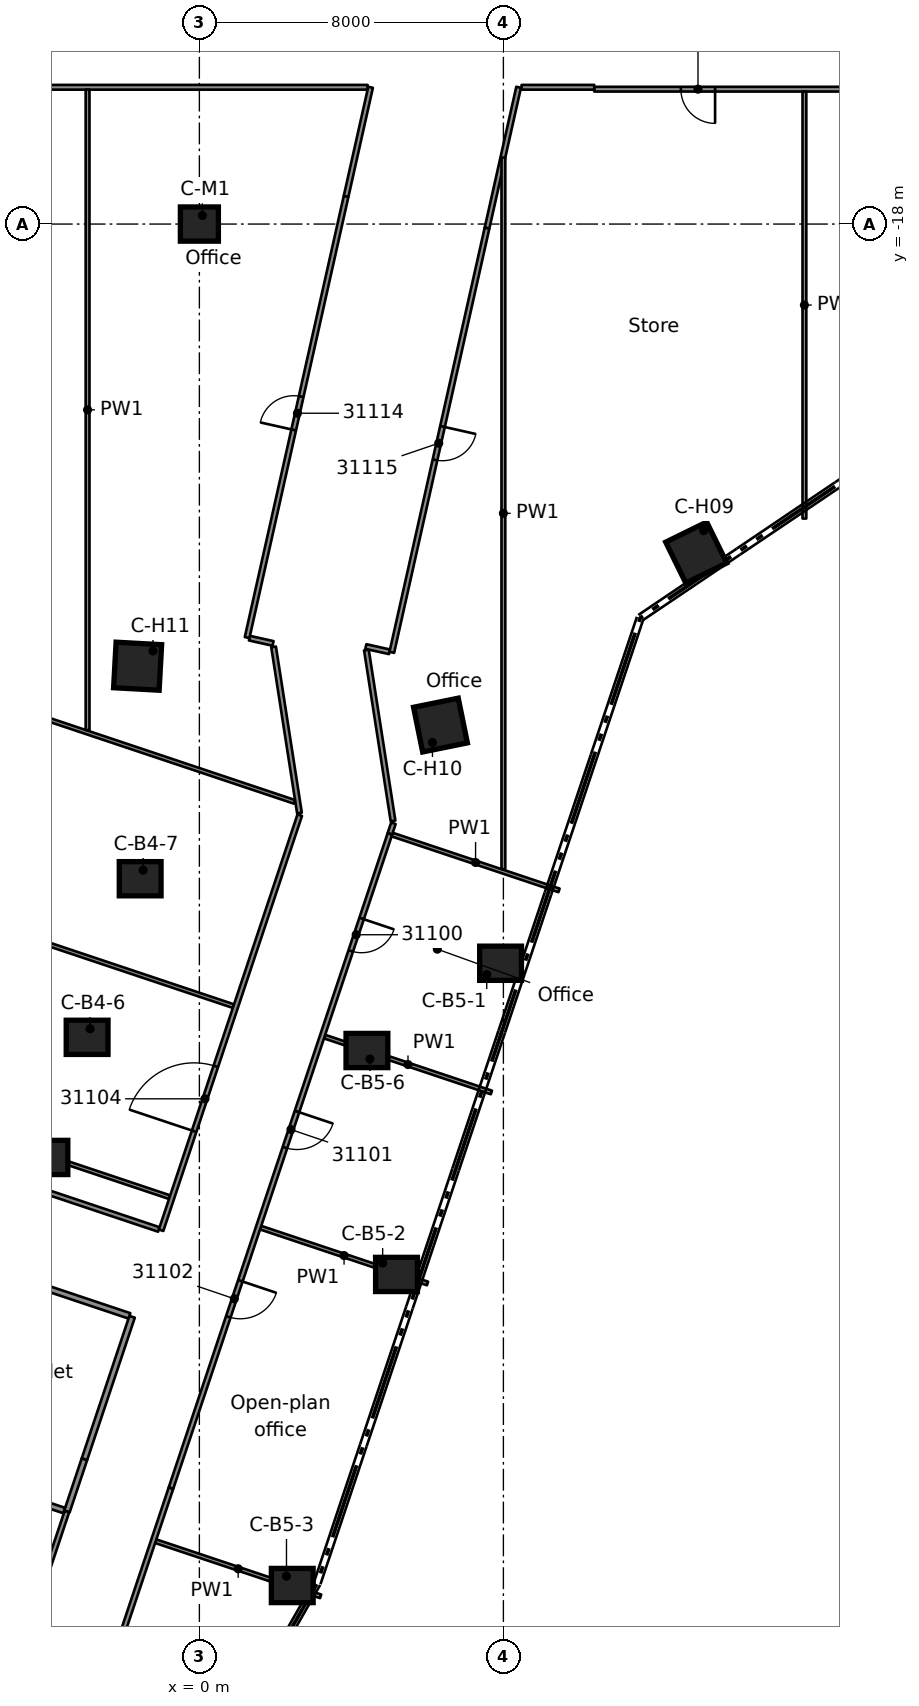
"""IFC4 building model, lengths in metres.
Left out: names, types, materials, properties, quantities, classifications, styles, units other than length and angle.
Written with IfcOpenShell. Run it as: python <this file> out.ifc"""

import sys

from ifc_helpers import new_model, si_unit, direction, frame, frame_2d, origin, origin_2d, place, context, subcontext, project, spatial, rectangle, extrude, element, fill, save


model = new_model("IFC4")
c1 = context("Model", 3, precision=1e-05, world=origin(), true_north=direction((0.0, 1.0)))
c2 = subcontext(c1, "Body", "Model", "MODEL_VIEW")
j1 = project(units=[si_unit("LENGTHUNIT", "METRE"), si_unit("PLANEANGLEUNIT", "RADIAN")], contexts=[c1])
p1 = place(None, origin())
s1 = spatial("IfcSite", under=j1, at=p1, CompositionType="ELEMENT")
p2 = place(p1, origin())
s2 = spatial("IfcBuilding", under=s1, at=p2, CompositionType="ELEMENT")
p3 = place(p2, frame((0.0, 0.0, 156.1)))
s3 = spatial("IfcBuildingStorey", under=s2, at=p3, CompositionType="ELEMENT", Elevation=156.1)
for number, where, z_axis, x_axis in (
    (1, (-4.012, -42.56, 0.0), (0.0, 0.0, 1.0), (1.0, 0.0, 0.0)),
    (2, (-2.954, -39.399, 0.0), (0.0, 0.0, 1.0), (1.0, 0.0, 0.0)),
    (3, (-1.558, -35.226, 0.0), (0.0, 0.0, 1.0), (1.0, 0.0, 0.0)),
    (4, (7.926, -37.45, 0.0), (0.0, 0.0, 1.0), (1.0, 0.0, 0.0)),
    (5, (5.187, -45.638, 0.0), (0.0, 0.0, 1.0), (1.0, 0.0, 0.0)),
    (6, (2.444, -53.823, 0.0), (0.0, 0.0, 1.0), (1.0, 0.0, 0.0)),
    (7, (4.409, -39.746, 0.0), (0.0, 0.0, 1.0), (1.0, 0.0, 0.0)),
):
    element("IfcColumn", number, at=place(p3, frame(where, z_axis=z_axis, x_axis=x_axis)), inside=s3, PredefinedType="COLUMN", context=c2, shape_type="SweptSolid", body=[
        extrude(rectangle(XDim=1.1, YDim=0.9, at=origin_2d()), origin(), (0.0, 0.0, 1.0), 3.5),
    ])
for number, where, z_axis, x_axis in (
    (8, (13.075, -26.644, 0.0), (0.0, 0.0, 1.0), (0.441, -0.898, 0.0)),
    (9, (6.344, -31.183, 0.0), (0.0, 0.0, 1.0), (0.199, -0.98, 0.0)),
    (10, (-1.625, -29.634, 0.0), (0.0, 0.0, 1.0), (-0.055, -0.998, 0.0)),
):
    element("IfcColumn", number, at=place(p3, frame(where, z_axis=z_axis, x_axis=x_axis)), inside=s3, PredefinedType="COLUMN", context=c2, shape_type="SweptSolid", body=[
        extrude(rectangle(XDim=1.2, YDim=1.2, at=origin_2d()), origin(), (0.0, 0.0, 1.0), 3.5),
    ])
p4 = place(p3, frame((0.0, -18.0, 0.0), z_axis=(0.0, 0.0, 1.0), x_axis=(1.0, 0.0, 0.0)))
e11 = element("IfcColumn", 11, at=p4, inside=s3, PredefinedType="COLUMN", context=c2, shape_type="SweptSolid", body=[
    extrude(rectangle(XDim=1.0, YDim=0.9, at=origin_2d()), origin(), (0.0, 0.0, 1.0), 3.5),
])
p5 = place(p3, frame((2.634, -33.497, 0.0), z_axis=(0.0, 0.0, 1.0), x_axis=(-0.153972826204, 0.988075082567, 0.0)))
e12 = element("IfcWall", 12, at=p5, inside=s3, PredefinedType="PARTITIONING", context=c2, shape_type="SweptSolid", body=[
    extrude(rectangle(XDim=4.424, YDim=0.125, at=frame_2d((2.212, 0.0))), origin(), (0.0, 0.0, 1.0), 3.08),
])
p6 = place(p3, frame((4.395, -29.207, 0.0), z_axis=(0.0, 0.0, 1.0), x_axis=(0.153971141753, -0.988075345056, 0.0)))
e13 = element("IfcWall", 13, at=p6, inside=s3, PredefinedType="PARTITIONING", context=c2, shape_type="SweptSolid", body=[
    extrude(rectangle(XDim=4.552, YDim=0.125, at=frame_2d((2.276, 0.0))), origin(), (0.0, 0.0, 1.0), 3.08),
])
p7 = place(p3, frame((-2.94, -57.547, 0.0), z_axis=(0.0, 0.0, 1.0), x_axis=(-0.948265401731, 0.317478704609, 0.0)))
e14 = element("IfcWall", 14, at=p7, inside=s3, PredefinedType="PARTITIONING", context=c2, shape_type="SweptSolid", body=[
    extrude(rectangle(XDim=30.966, YDim=0.125, at=frame_2d((15.483, 0.0))), origin(), (0.0, 0.0, 1.0), 3.08),
])
p8 = place(p7, frame((9.415, 0.0, 0.0)))
e15 = element("IfcOpeningElement", 15, at=p8, cuts=e14, PredefinedType="OPENING", context=c2, shape_type="SweptSolid", body=[
    extrude(rectangle(XDim=0.9, YDim=2.1, at=frame_2d((0.45, 1.05))), frame((0.0, 0.073, 0.0), z_axis=(0.0, -1.0, 0.0), x_axis=(1.0, 0.0, 0.0)), (0.0, 0.0, 1.0), 0.145),
])
p9 = place(p7, frame((19.9, 0.0, 0.0)))
e16 = element("IfcOpeningElement", 16, at=p9, cuts=e14, PredefinedType="OPENING", context=c2, shape_type="SweptSolid", body=[
    extrude(rectangle(XDim=1.1, YDim=2.1, at=frame_2d((0.55, 1.05))), frame((0.0, 0.073, 0.0), z_axis=(0.0, -1.0, 0.0), x_axis=(1.0, 0.0, 0.0)), (0.0, 0.0, 1.0), 0.145),
])
p10 = place(p3, frame((-28.366, -43.55, 0.0), z_axis=(0.0, 0.0, 1.0), x_axis=(0.948327152728, -0.317294203223, 0.0)))
e17 = element("IfcWall", 17, at=p10, inside=s3, PredefinedType="PARTITIONING", context=c2, shape_type="SweptSolid", body=[
    extrude(rectangle(XDim=26.162, YDim=0.15, at=frame_2d((13.081, 0.0))), origin(), (0.0, 0.0, 1.0), 3.08),
])
p11 = place(p3, frame((-1.149, -52.657, 0.0), z_axis=(0.0, 0.0, 1.0), x_axis=(0.948400148701, -0.317075949805, 0.0)))
e18 = element("IfcWall", 18, at=p11, inside=s3, PredefinedType="PARTITIONING", context=c2, shape_type="SweptSolid", body=[
    extrude(rectangle(XDim=4.576, YDim=0.1, at=frame_2d((2.288, 0.0))), origin(), (0.0, 0.0, 1.0), 3.08),
])
p12 = place(p3, frame((-1.841, -46.728, 0.0), z_axis=(0.0, 0.0, 1.0), x_axis=(-0.94832621322, 0.317297011205, 0.0)))
e19 = element("IfcWall", 19, at=p12, inside=s3, PredefinedType="PARTITIONING", context=c2, shape_type="SweptSolid", body=[
    extrude(rectangle(XDim=26.162, YDim=0.15, at=frame_2d((13.081, 0.0))), origin(), (0.0, 0.0, 1.0), 3.08),
])
p13 = place(p12, frame((12.525, 0.0, 0.0)))
e20 = element("IfcOpeningElement", 20, at=p13, cuts=e19, PredefinedType="OPENING", context=c2, shape_type="SweptSolid", body=[
    extrude(rectangle(XDim=0.9, YDim=2.1, at=frame_2d((0.45, 1.05))), frame((0.0, 0.085, 0.0), z_axis=(0.0, -1.0, 0.0), x_axis=(1.0, 0.0, 0.0)), (0.0, 0.0, 1.0), 0.17),
])
p14 = place(p3, frame((-25.901, -36.146, 0.0), z_axis=(0.0, 0.0, 1.0), x_axis=(0.948326561211, -0.317295971139, 0.0)))
e21 = element("IfcWall", 21, at=p14, inside=s3, PredefinedType="PARTITIONING", context=c2, shape_type="SweptSolid", body=[
    extrude(rectangle(XDim=26.187, YDim=0.125, at=frame_2d((13.094, 0.0))), origin(), (0.0, 0.0, 1.0), 3.08),
])
p15 = place(p14, frame((11.288, 0.0, 0.0)))
e22 = element("IfcOpeningElement", 22, at=p15, cuts=e21, PredefinedType="OPENING", context=c2, shape_type="SweptSolid", body=[
    extrude(rectangle(XDim=0.9, YDim=2.1, at=frame_2d((0.45, 1.05))), frame((0.0, 0.073, 0.0), z_axis=(0.0, -1.0, 0.0), x_axis=(1.0, 0.0, 0.0)), (0.0, 0.0, 1.0), 0.145),
])
p16 = place(p3, frame((-25.617, -35.296, 0.0), z_axis=(0.0, 0.0, 1.0), x_axis=(0.948326561211, -0.317295971139, 0.0)))
e23 = element("IfcWall", 23, at=p16, inside=s3, PredefinedType="PARTITIONING", context=c2, shape_type="SweptSolid", body=[
    extrude(rectangle(XDim=26.187, YDim=0.1, at=frame_2d((13.094, 0.0))), origin(), (0.0, 0.0, 1.0), 3.08),
])
p17 = place(p3, frame((1.612, -44.407, 0.0), z_axis=(0.0, 0.0, 1.0), x_axis=(0.948334710824, -0.317271612734, 0.0)))
e24 = element("IfcWall", 24, at=p17, inside=s3, PredefinedType="PARTITIONING", context=c2, shape_type="SweptSolid", body=[
    extrude(rectangle(XDim=4.63, YDim=0.1, at=frame_2d((2.315, 0.0))), origin(), (0.0, 0.0, 1.0), 3.08),
])
p18 = place(p3, frame((-23.935, -30.27, 0.0), z_axis=(0.0, 0.0, 1.0), x_axis=(0.948326561211, -0.317295971139, 0.0)))
e25 = element("IfcWall", 25, at=p18, inside=s3, PredefinedType="PARTITIONING", context=c2, shape_type="SweptSolid", body=[
    extrude(rectangle(XDim=26.187, YDim=0.1, at=frame_2d((13.094, 0.0))), origin(), (0.0, 0.0, 1.0), 3.08),
])
p19 = place(p3, frame((3.294, -39.38, 0.0), z_axis=(0.0, 0.0, 1.0), x_axis=(0.948260676976, -0.317492816455, 0.0)))
e26 = element("IfcWall", 26, at=p19, inside=s3, PredefinedType="PARTITIONING", context=c2, shape_type="SweptSolid", body=[
    extrude(rectangle(XDim=4.631, YDim=0.1, at=frame_2d((2.315, 0.0))), origin(), (0.0, 0.0, 1.0), 3.08),
])
p20 = place(p3, frame((-21.98, -25.012, 0.0), z_axis=(0.0, 0.0, 1.0), x_axis=(0.948330909895, -0.317282973603, 0.0)))
e27 = element("IfcWall", 27, at=p20, inside=s3, PredefinedType="PARTITIONING", context=c2, shape_type="SweptSolid", body=[
    extrude(rectangle(XDim=25.816, YDim=0.1, at=frame_2d((12.908, 0.0))), origin(), (0.0, 0.0, 1.0), 3.08),
])
p21 = place(p3, frame((5.072, -34.064, 0.0), z_axis=(0.0, 0.0, 1.0), x_axis=(0.948361239818, -0.317192305725, 0.0)))
e28 = element("IfcWall", 28, at=p21, inside=s3, PredefinedType="PARTITIONING", context=c2, shape_type="SweptSolid", body=[
    extrude(rectangle(XDim=4.631, YDim=0.1, at=frame_2d((2.316, 0.0))), origin(), (0.0, 0.0, 1.0), 3.08),
])
p22 = place(p3, frame((1.317, -28.896, 0.0), z_axis=(0.0, 0.0, 1.0), x_axis=(0.9759612217, -0.217944244563, 0.0)))
e29 = element("IfcWall", 29, at=p22, inside=s3, PredefinedType="PARTITIONING", context=c2, shape_type="SweptSolid", body=[
    extrude(rectangle(XDim=0.637, YDim=0.125, at=frame_2d((0.319, 0.0))), origin(), (0.0, 0.0, 1.0), 3.08),
])
p23 = place(p3, frame((4.381, -29.116, 0.0), z_axis=(0.0, 0.0, 1.0), x_axis=(0.975943017671, -0.218025746782, 0.0)))
e30 = element("IfcWall", 30, at=p23, inside=s3, PredefinedType="PARTITIONING", context=c2, shape_type="SweptSolid", body=[
    extrude(rectangle(XDim=0.637, YDim=0.125, at=frame_2d((0.319, 0.0))), origin(), (0.0, 0.0, 1.0), 3.08),
])
p24 = place(p3, frame((21.387, -14.451, 0.0), z_axis=(0.0, 0.0, 1.0), x_axis=(-1.0, 0.0, 0.0)))
e31 = element("IfcWall", 31, at=p24, inside=s3, PredefinedType="PARTITIONING", context=c2, shape_type="SweptSolid", body=[
    extrude(rectangle(XDim=10.996, YDim=0.125, at=frame_2d((5.498, 0.0))), origin(), (0.0, 0.0, 1.0), 3.08),
])
p25 = place(p24, frame((7.816, 0.0, 0.0)))
e32 = element("IfcOpeningElement", 32, at=p25, cuts=e31, PredefinedType="OPENING", context=c2, shape_type="SweptSolid", body=[
    extrude(rectangle(XDim=0.9, YDim=2.1, at=frame_2d((0.45, 1.05))), frame((0.0, 0.073, 0.0), z_axis=(0.0, -1.0, 0.0), x_axis=(1.0, 0.0, 0.0)), (0.0, 0.0, 1.0), 0.145),
])
p26 = place(p24, frame((2.288, 0.0, 0.0)))
e33 = element("IfcOpeningElement", 33, at=p26, cuts=e31, PredefinedType="OPENING", context=c2, shape_type="SweptSolid", body=[
    extrude(rectangle(XDim=0.9, YDim=2.1, at=frame_2d((0.45, 1.05))), frame((0.0, 0.073, 0.0), z_axis=(0.0, -1.0, 0.0), x_axis=(1.0, 0.0, 0.0)), (0.0, 0.0, 1.0), 0.145),
])
p27 = place(p3, frame((-10.39, -14.401, 0.0), z_axis=(0.0, 0.0, 1.0), x_axis=(1.0, 0.0, 0.0)))
e34 = element("IfcWall", 34, at=p27, inside=s3, PredefinedType="PARTITIONING", context=c2, shape_type="SweptSolid", body=[
    extrude(rectangle(XDim=14.817, YDim=0.125, at=frame_2d((7.408, 0.0))), origin(), (0.0, 0.0, 1.0), 3.08),
])
p28 = place(p3, frame((8.479, -14.401, 0.0), z_axis=(0.0, 0.0, 1.0), x_axis=(1.0, 0.0, 0.0)))
e35 = element("IfcWall", 35, at=p28, inside=s3, PredefinedType="PARTITIONING", context=c2, shape_type="SweptSolid", body=[
    extrude(rectangle(XDim=1.912, YDim=0.125, at=frame_2d((0.956, 0.0))), origin(), (0.0, 0.0, 1.0), 3.08),
])
p29 = place(p3, frame((-2.858, -57.568, 0.0), z_axis=(0.0, 0.0, 1.0), x_axis=(0.317328623894, 0.94831563546, 0.0)))
e36 = element("IfcWall", 36, at=p29, inside=s3, PredefinedType="PARTITIONING", context=c2, shape_type="SweptSolid", body=[
    extrude(rectangle(XDim=6.652, YDim=0.125, at=frame_2d((3.326, 0.0))), origin(), (0.0, 0.0, 1.0), 3.08),
])
p30 = place(p3, frame((5.013, -34.044, 0.0), z_axis=(0.0, 0.0, 1.0), x_axis=(0.318483843222, 0.947928289274, 0.0)))
e37 = element("IfcWall", 37, at=p30, inside=s3, PredefinedType="PARTITIONING", context=c2, shape_type="SweptSolid", body=[
    extrude(rectangle(XDim=0.292, YDim=0.125, at=frame_2d((0.146, 0.0))), origin(), (0.0, 0.0, 1.0), 3.08),
])
p31 = place(p3, frame((5.014, -34.047, 0.0), z_axis=(0.0, 0.0, 1.0), x_axis=(-0.317385597106, -0.948296568986, 0.0)))
e38 = element("IfcWall", 38, at=p31, inside=s3, PredefinedType="PARTITIONING", context=c2, shape_type="SweptSolid", body=[
    extrude(rectangle(XDim=18.151, YDim=0.125, at=frame_2d((9.076, 0.0))), origin(), (0.0, 0.0, 1.0), 3.08),
])
p32 = place(p31, frame((2.347, 0.0, 0.0)))
e39 = element("IfcOpeningElement", 39, at=p32, cuts=e38, PredefinedType="OPENING", context=c2, shape_type="SweptSolid", body=[
    extrude(rectangle(XDim=0.9, YDim=2.1, at=frame_2d((0.45, 1.05))), frame((0.0, 0.073, 0.0), z_axis=(0.0, -1.0, 0.0), x_axis=(1.0, 0.0, 0.0)), (0.0, 0.0, 1.0), 0.145),
])
p33 = place(p31, frame((7.703, 0.0, 0.0)))
e40 = element("IfcOpeningElement", 40, at=p33, cuts=e38, PredefinedType="OPENING", context=c2, shape_type="SweptSolid", body=[
    extrude(rectangle(XDim=1.0, YDim=2.1, at=frame_2d((0.5, 1.05))), frame((0.0, 0.073, 0.0), z_axis=(0.0, -1.0, 0.0), x_axis=(1.0, 0.0, 0.0)), (0.0, 0.0, 1.0), 0.145),
])
p34 = place(p31, frame((12.399, 0.0, 0.0)))
e41 = element("IfcOpeningElement", 41, at=p34, cuts=e38, PredefinedType="OPENING", context=c2, shape_type="SweptSolid", body=[
    extrude(rectangle(XDim=1.0, YDim=2.1, at=frame_2d((0.5, 1.05))), frame((0.0, 0.073, 0.0), z_axis=(0.0, -1.0, 0.0), x_axis=(1.0, 0.0, 0.0)), (0.0, 0.0, 1.0), 0.145),
])
p35 = place(p3, frame((-3.485, -51.875, 0.0), z_axis=(0.0, 0.0, 1.0), x_axis=(0.317791901712, 0.948160485997, 0.0)))
e42 = element("IfcWall", 42, at=p35, inside=s3, PredefinedType="PARTITIONING", context=c2, shape_type="SweptSolid", body=[
    extrude(rectangle(XDim=1.451, YDim=0.15, at=frame_2d((0.726, 0.0))), origin(), (0.0, 0.0, 1.0), 3.08),
])
p36 = place(p3, frame((-4.278, -54.245, 0.0), z_axis=(0.0, 0.0, 1.0), x_axis=(0.31728257411, 0.948331043553, 0.0)))
e43 = element("IfcWall", 43, at=p36, inside=s3, PredefinedType="PARTITIONING", context=c2, shape_type="SweptSolid", body=[
    extrude(rectangle(XDim=2.499, YDim=0.125, at=frame_2d((1.25, 0.0))), origin(), (0.0, 0.0, 1.0), 3.08),
])
p37 = place(p3, frame((-3.024, -50.499, 0.0), z_axis=(0.0, 0.0, 1.0), x_axis=(0.317339720629, 0.94831192216, 0.0)))
e44 = element("IfcWall", 44, at=p37, inside=s3, PredefinedType="PARTITIONING", context=c2, shape_type="SweptSolid", body=[
    extrude(rectangle(XDim=3.951, YDim=0.15, at=frame_2d((1.976, 0.0))), origin(), (0.0, 0.0, 1.0), 3.08),
])
p38 = place(p3, frame((-1.008, -44.475, 0.0), z_axis=(0.0, 0.0, 1.0), x_axis=(0.316889155775, 0.948462578572, 0.0)))
e45 = element("IfcWall", 45, at=p38, inside=s3, PredefinedType="PARTITIONING", context=c2, shape_type="SweptSolid", body=[
    extrude(rectangle(XDim=11.516, YDim=0.125, at=frame_2d((5.758, 0.0))), origin(), (0.0, 0.0, 1.0), 3.08),
])
p39 = place(p38, frame((2.746, 0.0, 0.0)))
e46 = element("IfcOpeningElement", 46, at=p39, cuts=e45, PredefinedType="OPENING", context=c2, shape_type="SweptSolid", body=[
    extrude(rectangle(XDim=1.8, YDim=2.1, at=frame_2d((0.9, 1.05))), frame((0.0, 0.073, 0.0), z_axis=(0.0, -1.0, 0.0), x_axis=(1.0, 0.0, 0.0)), (0.0, 0.0, 1.0), 0.145),
])
p40 = place(p3, frame((7.569, -18.107, 0.0), z_axis=(0.0, 0.0, 1.0), x_axis=(0.218992134919, 0.975726624031, 0.0)))
e47 = element("IfcWall", 47, at=p40, inside=s3, PredefinedType="PARTITIONING", context=c2, shape_type="SweptSolid", body=[
    extrude(rectangle(XDim=3.798, YDim=0.125, at=frame_2d((1.899, 0.0))), origin(), (0.0, 0.0, 1.0), 3.08),
])
p41 = place(p3, frame((3.86, -17.274, 0.0), z_axis=(0.0, 0.0, 1.0), x_axis=(0.218975515368, 0.975730353976, 0.0)))
e48 = element("IfcWall", 48, at=p41, inside=s3, PredefinedType="PARTITIONING", context=c2, shape_type="SweptSolid", body=[
    extrude(rectangle(XDim=2.945, YDim=0.125, at=frame_2d((1.472, 0.0))), origin(), (0.0, 0.0, 1.0), 3.08),
])
p42 = place(p3, frame((7.569, -18.107, 0.0), z_axis=(0.0, 0.0, 1.0), x_axis=(-0.218984023809, -0.975728444454, 0.0)))
e49 = element("IfcWall", 49, at=p42, inside=s3, PredefinedType="PARTITIONING", context=c2, shape_type="SweptSolid", body=[
    extrude(rectangle(XDim=11.44, YDim=0.125, at=frame_2d((5.72, 0.0))), origin(), (0.0, 0.0, 1.0), 3.08),
])
p43 = place(p42, frame((5.35, 0.0, 0.0)))
e50 = element("IfcOpeningElement", 50, at=p43, cuts=e49, PredefinedType="OPENING", context=c2, shape_type="SweptSolid", body=[
    extrude(rectangle(XDim=0.9, YDim=2.1, at=frame_2d((0.45, 1.05))), frame((0.0, 0.073, 0.0), z_axis=(0.0, -1.0, 0.0), x_axis=(1.0, 0.0, 0.0)), (0.0, 0.0, 1.0), 0.145),
])
p44 = place(p3, frame((1.256, -28.881, 0.0), z_axis=(0.0, 0.0, 1.0), x_axis=(0.218920699835, 0.975742654179, 0.0)))
e51 = element("IfcWall", 51, at=p44, inside=s3, PredefinedType="PARTITIONING", context=c2, shape_type="SweptSolid", body=[
    extrude(rectangle(XDim=11.895, YDim=0.125, at=frame_2d((5.947, 0.0))), origin(), (0.0, 0.0, 1.0), 3.08),
])
p45 = place(p44, frame((5.6, 0.0, 0.0)))
e52 = element("IfcOpeningElement", 52, at=p45, cuts=e51, PredefinedType="OPENING", context=c2, shape_type="SweptSolid", body=[
    extrude(rectangle(XDim=0.9, YDim=2.1, at=frame_2d((0.45, 1.05))), frame((0.0, 0.073, 0.0), z_axis=(0.0, -1.0, 0.0), x_axis=(1.0, 0.0, 0.0)), (0.0, 0.0, 1.0), 0.145),
])
p46 = place(p3, frame((15.921, -25.749, 0.0), z_axis=(0.0, 0.0, 1.0), x_axis=(0.0, 1.0, 0.0)))
e53 = element("IfcWall", 53, at=p46, inside=s3, PredefinedType="PARTITIONING", context=c2, shape_type="SweptSolid", body=[
    extrude(rectangle(XDim=11.235, YDim=0.1, at=frame_2d((5.618, 0.0))), origin(), (0.0, 0.0, 1.0), 3.08),
])
p47 = place(p3, frame((8.0, -34.974, 0.0), z_axis=(0.0, 0.0, 1.0), x_axis=(0.0, 1.0, 0.0)))
e54 = element("IfcWall", 54, at=p47, inside=s3, PredefinedType="PARTITIONING", context=c2, shape_type="SweptSolid", body=[
    extrude(rectangle(XDim=18.724, YDim=0.1, at=frame_2d((9.362, 0.0))), origin(), (0.0, 0.0, 1.0), 3.08),
])
p48 = place(p3, frame((-2.942, -31.313, 0.0), z_axis=(0.0, 0.0, 1.0), x_axis=(0.0, 1.0, 0.0)))
e55 = element("IfcWall", 55, at=p48, inside=s3, PredefinedType="PARTITIONING", context=c2, shape_type="SweptSolid", body=[
    extrude(rectangle(XDim=16.85, YDim=0.1, at=frame_2d((8.425, 0.0))), origin(), (0.0, 0.0, 1.0), 3.08),
])
p49 = place(p32, origin())
e56 = element("IfcDoor", 56, at=p49, inside=s3, OperationType="SINGLE_SWING_LEFT", PredefinedType="DOOR", context=c2, shape_type="SweptSolid", body=[
    extrude(rectangle(XDim=0.9, YDim=2.1, at=frame_2d((0.45, 1.05))), frame((0.0, 0.025, 0.0), z_axis=(0.0, -1.0, 0.0), x_axis=(1.0, 0.0, 0.0)), (0.0, 0.0, 1.0), 0.05),
])
fill(e39, e56)
p50 = place(p33, origin())
e57 = element("IfcDoor", 57, at=p50, inside=s3, OperationType="SINGLE_SWING_LEFT", PredefinedType="DOOR", context=c2, shape_type="SweptSolid", body=[
    extrude(rectangle(XDim=1.0, YDim=2.1, at=frame_2d((0.5, 1.05))), frame((0.0, 0.025, 0.0), z_axis=(0.0, -1.0, 0.0), x_axis=(1.0, 0.0, 0.0)), (0.0, 0.0, 1.0), 0.05),
])
fill(e40, e57)
p51 = place(p34, origin())
e58 = element("IfcDoor", 58, at=p51, inside=s3, OperationType="SINGLE_SWING_RIGHT", PredefinedType="DOOR", context=c2, shape_type="SweptSolid", body=[
    extrude(rectangle(XDim=1.0, YDim=2.1, at=frame_2d((0.5, 1.05))), frame((0.0, 0.025, 0.0), z_axis=(0.0, -1.0, 0.0), x_axis=(1.0, 0.0, 0.0)), (0.0, 0.0, 1.0), 0.05),
])
fill(e41, e58)
p52 = place(p39, origin())
e59 = element("IfcDoor", 59, at=p52, inside=s3, OperationType="DOUBLE_DOOR_SINGLE_SWING", PredefinedType="DOOR", context=c2, shape_type="SweptSolid", body=[
    extrude(rectangle(XDim=1.8, YDim=2.1, at=frame_2d((0.9, 1.05))), frame((0.0, 0.025, 0.0), z_axis=(0.0, -1.0, 0.0), x_axis=(1.0, 0.0, 0.0)), (0.0, 0.0, 1.0), 0.05),
])
fill(e46, e59)
p53 = place(p45, origin())
e60 = element("IfcDoor", 60, at=p53, inside=s3, OperationType="SINGLE_SWING_RIGHT", PredefinedType="DOOR", context=c2, shape_type="SweptSolid", body=[
    extrude(rectangle(XDim=0.9, YDim=2.1, at=frame_2d((0.45, 1.05))), frame((0.0, 0.025, 0.0), z_axis=(0.0, -1.0, 0.0), x_axis=(1.0, 0.0, 0.0)), (0.0, 0.0, 1.0), 0.05),
])
fill(e52, e60)
p54 = place(p43, origin())
e61 = element("IfcDoor", 61, at=p54, inside=s3, OperationType="SINGLE_SWING_RIGHT", PredefinedType="DOOR", context=c2, shape_type="SweptSolid", body=[
    extrude(rectangle(XDim=0.9, YDim=2.1, at=frame_2d((0.45, 1.05))), frame((0.0, 0.025, 0.0), z_axis=(0.0, -1.0, 0.0), x_axis=(1.0, 0.0, 0.0)), (0.0, 0.0, 1.0), 0.05),
])
fill(e50, e61)
p55 = place(p25, origin())
e62 = element("IfcDoor", 62, at=p55, inside=s3, OperationType="SINGLE_SWING_RIGHT", PredefinedType="DOOR", context=c2, shape_type="SweptSolid", body=[
    extrude(rectangle(XDim=0.9, YDim=2.1, at=frame_2d((0.45, 1.05))), frame((0.0, 0.025, 0.0), z_axis=(0.0, -1.0, 0.0), x_axis=(1.0, 0.0, 0.0)), (0.0, 0.0, 1.0), 0.05),
])
fill(e32, e62)
save(model, sys.argv[1])
